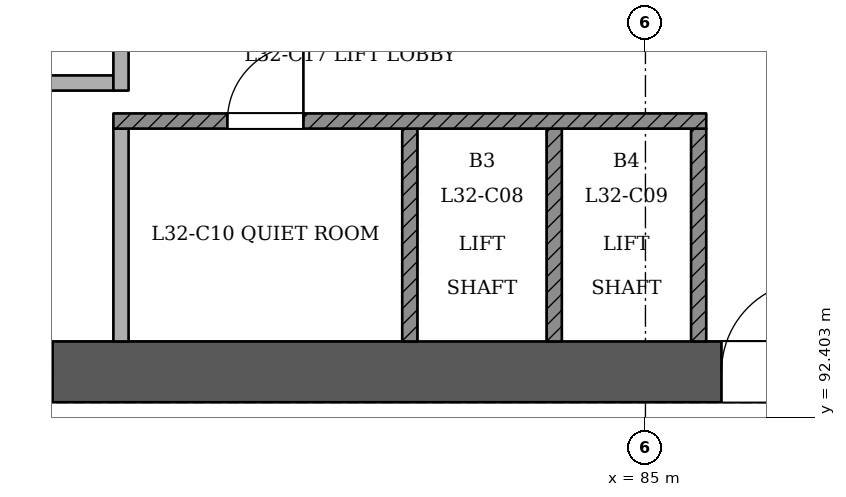
"""IFC4 building model, lengths in metres.
Left out: names, types, materials, properties, quantities, classifications, styles, units other than length and angle.
Written with IfcOpenShell. Run it as: python <this file> out.ifc"""

import sys

from ifc_helpers import new_model, si_unit, direction, frame, frame_2d, origin, place, context, subcontext, project, spatial, rectangle, extrude, element, fill, save


model = new_model("IFC4")
c1 = context("Model", 3, precision=1e-05, world=origin(), true_north=direction((0.0, 1.0)))
c2 = subcontext(c1, "Body", "Model", "MODEL_VIEW")
j1 = project(units=[si_unit("LENGTHUNIT", "METRE"), si_unit("PLANEANGLEUNIT", "RADIAN")], contexts=[c1])
p1 = place(None, origin())
s1 = spatial("IfcSite", under=j1, at=p1, CompositionType="ELEMENT")
p2 = place(p1, origin())
s2 = spatial("IfcBuilding", under=s1, at=p2, CompositionType="ELEMENT")
p3 = place(p2, frame((0.0, 0.0, 127.8)))
s3 = spatial("IfcBuildingStorey", under=s2, at=p3, CompositionType="ELEMENT", Elevation=127.8)
p4 = place(p3, frame((72.6, 93.0, 0.0), z_axis=(0.0, 0.0, 1.0), x_axis=(1.0, 0.0, 0.0)))
e1 = element("IfcWall", 1, at=p4, inside=s3, PredefinedType="SHEAR", context=c2, shape_type="SweptSolid", body=[
    extrude(rectangle(XDim=25.2, YDim=0.8, at=frame_2d((12.6, 0.0))), origin(), (0.0, 0.0, 1.0), 3.6),
])
p5 = place(p4, frame((1.2, 0.0, 0.0)))
e2 = element("IfcOpeningElement", 2, at=p5, cuts=e1, PredefinedType="OPENING", context=c2, shape_type="SweptSolid", body=[
    extrude(rectangle(XDim=1.2, YDim=2.1, at=frame_2d((0.6, 1.05))), frame((0.0, 0.411, 0.0), z_axis=(0.0, -1.0, 0.0), x_axis=(1.0, 0.0, 0.0)), (0.0, 0.0, 1.0), 0.821),
])
p6 = place(p4, frame((3.4, 0.0, 0.0)))
e3 = element("IfcOpeningElement", 3, at=p6, cuts=e1, PredefinedType="OPENING", context=c2, shape_type="SweptSolid", body=[
    extrude(rectangle(XDim=1.2, YDim=2.1, at=frame_2d((0.6, 1.05))), frame((0.0, 0.411, 0.0), z_axis=(0.0, -1.0, 0.0), x_axis=(1.0, 0.0, 0.0)), (0.0, 0.0, 1.0), 0.821),
])
p7 = place(p4, frame((13.4, 0.0, 0.0)))
e4 = element("IfcOpeningElement", 4, at=p7, cuts=e1, PredefinedType="OPENING", context=c2, shape_type="SweptSolid", body=[
    extrude(rectangle(XDim=1.2, YDim=2.1, at=frame_2d((0.6, 1.05))), frame((0.0, 0.411, 0.0), z_axis=(0.0, -1.0, 0.0), x_axis=(1.0, 0.0, 0.0)), (0.0, 0.0, 1.0), 0.821),
])
p8 = place(p4, frame((16.113, 0.0, 0.0)))
e5 = element("IfcOpeningElement", 5, at=p8, cuts=e1, PredefinedType="OPENING", context=c2, shape_type="SweptSolid", body=[
    extrude(rectangle(XDim=1.0, YDim=2.1, at=frame_2d((0.5, 1.05))), frame((0.0, 0.411, 0.0), z_axis=(0.0, -1.0, 0.0), x_axis=(1.0, 0.0, 0.0)), (0.0, 0.0, 1.0), 0.821),
])
p9 = place(p4, frame((20.0, 0.0, 0.0)))
e6 = element("IfcOpeningElement", 6, at=p9, cuts=e1, PredefinedType="OPENING", context=c2, shape_type="SweptSolid", body=[
    extrude(rectangle(XDim=1.0, YDim=2.1, at=frame_2d((0.5, 1.05))), frame((0.0, 0.411, 0.0), z_axis=(0.0, -1.0, 0.0), x_axis=(1.0, 0.0, 0.0)), (0.0, 0.0, 1.0), 0.821),
])
p10 = place(p4, frame((23.137, 0.0, 0.0)))
e7 = element("IfcOpeningElement", 7, at=p10, cuts=e1, PredefinedType="OPENING", context=c2, shape_type="SweptSolid", body=[
    extrude(rectangle(XDim=1.0, YDim=2.1, at=frame_2d((0.5, 1.05))), frame((0.0, 0.411, 0.0), z_axis=(0.0, -1.0, 0.0), x_axis=(1.0, 0.0, 0.0)), (0.0, 0.0, 1.0), 0.821),
])
p11 = place(p3, frame((64.534, 98.206, 0.0), z_axis=(0.0, 0.0, 1.0), x_axis=(0.499999603446, -0.866025632735, 0.0)))
e8 = element("IfcWall", 8, at=p11, inside=s3, PredefinedType="PARTITIONING", context=c2, shape_type="SweptSolid", body=[
    extrude(rectangle(XDim=40.592, YDim=0.15, at=frame_2d((20.296, 0.0))), origin(), (0.0, 0.0, 1.0), 2.75),
])
p12 = place(p11, frame((0.2, 0.0, 0.0)))
e9 = element("IfcOpeningElement", 9, at=p12, cuts=e8, PredefinedType="OPENING", context=c2, shape_type="SweptSolid", body=[
    extrude(rectangle(XDim=1.2, YDim=2.1, at=frame_2d((0.6, 1.05))), frame((0.0, 0.085, 0.0), z_axis=(0.0, -1.0, 0.0), x_axis=(1.0, 0.0, 0.0)), (0.0, 0.0, 1.0), 0.171),
])
p13 = place(p11, frame((3.016, 0.0, 0.0)))
e10 = element("IfcOpeningElement", 10, at=p13, cuts=e8, PredefinedType="OPENING", context=c2, shape_type="SweptSolid", body=[
    extrude(rectangle(XDim=1.0, YDim=2.1, at=frame_2d((0.5, 1.05))), frame((0.0, 0.085, 0.0), z_axis=(0.0, -1.0, 0.0), x_axis=(1.0, 0.0, 0.0)), (0.0, 0.0, 1.0), 0.171),
])
p14 = place(p11, frame((9.691, 0.0, 0.0)))
e11 = element("IfcOpeningElement", 11, at=p14, cuts=e8, PredefinedType="OPENING", context=c2, shape_type="SweptSolid", body=[
    extrude(rectangle(XDim=1.0, YDim=2.1, at=frame_2d((0.5, 1.05))), frame((0.0, 0.085, 0.0), z_axis=(0.0, -1.0, 0.0), x_axis=(1.0, 0.0, 0.0)), (0.0, 0.0, 1.0), 0.171),
])
p15 = place(p11, frame((11.901, 0.0, 0.0)))
e12 = element("IfcOpeningElement", 12, at=p15, cuts=e8, PredefinedType="OPENING", context=c2, shape_type="SweptSolid", body=[
    extrude(rectangle(XDim=1.0, YDim=2.1, at=frame_2d((0.5, 1.05))), frame((0.0, 0.085, 0.0), z_axis=(0.0, -1.0, 0.0), x_axis=(1.0, 0.0, 0.0)), (0.0, 0.0, 1.0), 0.171),
])
p16 = place(p11, frame((18.576, 0.0, 0.0)))
e13 = element("IfcOpeningElement", 13, at=p16, cuts=e8, PredefinedType="OPENING", context=c2, shape_type="SweptSolid", body=[
    extrude(rectangle(XDim=1.0, YDim=2.1, at=frame_2d((0.5, 1.05))), frame((0.0, 0.085, 0.0), z_axis=(0.0, -1.0, 0.0), x_axis=(1.0, 0.0, 0.0)), (0.0, 0.0, 1.0), 0.171),
])
p17 = place(p11, frame((22.046, 0.0, 0.0)))
e14 = element("IfcOpeningElement", 14, at=p17, cuts=e8, PredefinedType="OPENING", context=c2, shape_type="SweptSolid", body=[
    extrude(rectangle(XDim=1.0, YDim=2.1, at=frame_2d((0.5, 1.05))), frame((0.0, 0.085, 0.0), z_axis=(0.0, -1.0, 0.0), x_axis=(1.0, 0.0, 0.0)), (0.0, 0.0, 1.0), 0.171),
])
p18 = place(p11, frame((27.576, 0.0, 0.0)))
e15 = element("IfcOpeningElement", 15, at=p18, cuts=e8, PredefinedType="OPENING", context=c2, shape_type="SweptSolid", body=[
    extrude(rectangle(XDim=1.0, YDim=2.1, at=frame_2d((0.5, 1.05))), frame((0.0, 0.085, 0.0), z_axis=(0.0, -1.0, 0.0), x_axis=(1.0, 0.0, 0.0)), (0.0, 0.0, 1.0), 0.171),
])
p19 = place(p11, frame((31.046, 0.0, 0.0)))
e16 = element("IfcOpeningElement", 16, at=p19, cuts=e8, PredefinedType="OPENING", context=c2, shape_type="SweptSolid", body=[
    extrude(rectangle(XDim=1.0, YDim=2.1, at=frame_2d((0.5, 1.05))), frame((0.0, 0.085, 0.0), z_axis=(0.0, -1.0, 0.0), x_axis=(1.0, 0.0, 0.0)), (0.0, 0.0, 1.0), 0.171),
])
p20 = place(p11, frame((36.576, 0.0, 0.0)))
e17 = element("IfcOpeningElement", 17, at=p20, cuts=e8, PredefinedType="OPENING", context=c2, shape_type="SweptSolid", body=[
    extrude(rectangle(XDim=1.0, YDim=2.1, at=frame_2d((0.5, 1.05))), frame((0.0, 0.085, 0.0), z_axis=(0.0, -1.0, 0.0), x_axis=(1.0, 0.0, 0.0)), (0.0, 0.0, 1.0), 0.171),
])
p21 = place(p11, frame((39.323, 0.0, 0.0)))
e18 = element("IfcOpeningElement", 18, at=p21, cuts=e8, PredefinedType="OPENING", context=c2, shape_type="SweptSolid", body=[
    extrude(rectangle(XDim=1.0, YDim=2.1, at=frame_2d((0.5, 1.05))), frame((0.0, 0.085, 0.0), z_axis=(0.0, -1.0, 0.0), x_axis=(1.0, 0.0, 0.0)), (0.0, 0.0, 1.0), 0.171),
])
p22 = place(p3, frame((85.17, 63.052, 0.0), z_axis=(0.0, 0.0, 1.0), x_axis=(0.499999603446, 0.866025632735, 0.0)))
e19 = element("IfcWall", 19, at=p22, inside=s3, PredefinedType="PARTITIONING", context=c2, shape_type="SweptSolid", body=[
    extrude(rectangle(XDim=40.592, YDim=0.15, at=frame_2d((20.296, 0.0))), origin(), (0.0, 0.0, 1.0), 2.75),
])
p23 = place(p22, frame((0.273, 0.0, 0.0)))
e20 = element("IfcOpeningElement", 20, at=p23, cuts=e19, PredefinedType="OPENING", context=c2, shape_type="SweptSolid", body=[
    extrude(rectangle(XDim=1.2, YDim=2.1, at=frame_2d((0.6, 1.05))), frame((0.0, 0.085, 0.0), z_axis=(0.0, -1.0, 0.0), x_axis=(1.0, 0.0, 0.0)), (0.0, 0.0, 1.0), 0.171),
])
p24 = place(p22, frame((4.046, 0.0, 0.0)))
e21 = element("IfcOpeningElement", 21, at=p24, cuts=e19, PredefinedType="OPENING", context=c2, shape_type="SweptSolid", body=[
    extrude(rectangle(XDim=1.0, YDim=2.1, at=frame_2d((0.5, 1.05))), frame((0.0, 0.085, 0.0), z_axis=(0.0, -1.0, 0.0), x_axis=(1.0, 0.0, 0.0)), (0.0, 0.0, 1.0), 0.171),
])
p25 = place(p22, frame((9.576, 0.0, 0.0)))
e22 = element("IfcOpeningElement", 22, at=p25, cuts=e19, PredefinedType="OPENING", context=c2, shape_type="SweptSolid", body=[
    extrude(rectangle(XDim=1.0, YDim=2.1, at=frame_2d((0.5, 1.05))), frame((0.0, 0.085, 0.0), z_axis=(0.0, -1.0, 0.0), x_axis=(1.0, 0.0, 0.0)), (0.0, 0.0, 1.0), 0.171),
])
p26 = place(p22, frame((11.901, 0.0, 0.0)))
e23 = element("IfcOpeningElement", 23, at=p26, cuts=e19, PredefinedType="OPENING", context=c2, shape_type="SweptSolid", body=[
    extrude(rectangle(XDim=1.0, YDim=2.1, at=frame_2d((0.5, 1.05))), frame((0.0, 0.085, 0.0), z_axis=(0.0, -1.0, 0.0), x_axis=(1.0, 0.0, 0.0)), (0.0, 0.0, 1.0), 0.171),
])
p27 = place(p22, frame((18.691, 0.0, 0.0)))
e24 = element("IfcOpeningElement", 24, at=p27, cuts=e19, PredefinedType="OPENING", context=c2, shape_type="SweptSolid", body=[
    extrude(rectangle(XDim=1.0, YDim=2.1, at=frame_2d((0.5, 1.05))), frame((0.0, 0.085, 0.0), z_axis=(0.0, -1.0, 0.0), x_axis=(1.0, 0.0, 0.0)), (0.0, 0.0, 1.0), 0.171),
])
p28 = place(p22, frame((21.016, 0.0, 0.0)))
e25 = element("IfcOpeningElement", 25, at=p28, cuts=e19, PredefinedType="OPENING", context=c2, shape_type="SweptSolid", body=[
    extrude(rectangle(XDim=1.0, YDim=2.1, at=frame_2d((0.5, 1.05))), frame((0.0, 0.085, 0.0), z_axis=(0.0, -1.0, 0.0), x_axis=(1.0, 0.0, 0.0)), (0.0, 0.0, 1.0), 0.171),
])
p29 = place(p22, frame((27.576, 0.0, 0.0)))
e26 = element("IfcOpeningElement", 26, at=p29, cuts=e19, PredefinedType="OPENING", context=c2, shape_type="SweptSolid", body=[
    extrude(rectangle(XDim=1.0, YDim=2.1, at=frame_2d((0.5, 1.05))), frame((0.0, 0.085, 0.0), z_axis=(0.0, -1.0, 0.0), x_axis=(1.0, 0.0, 0.0)), (0.0, 0.0, 1.0), 0.171),
])
p30 = place(p22, frame((30.016, 0.0, 0.0)))
e27 = element("IfcOpeningElement", 27, at=p30, cuts=e19, PredefinedType="OPENING", context=c2, shape_type="SweptSolid", body=[
    extrude(rectangle(XDim=1.0, YDim=2.1, at=frame_2d((0.5, 1.05))), frame((0.0, 0.085, 0.0), z_axis=(0.0, -1.0, 0.0), x_axis=(1.0, 0.0, 0.0)), (0.0, 0.0, 1.0), 0.171),
])
p31 = place(p22, frame((39.192, 0.0, 0.0)))
e28 = element("IfcOpeningElement", 28, at=p31, cuts=e19, PredefinedType="OPENING", context=c2, shape_type="SweptSolid", body=[
    extrude(rectangle(XDim=1.2, YDim=2.1, at=frame_2d((0.6, 1.05))), frame((0.0, 0.085, 0.0), z_axis=(0.0, -1.0, 0.0), x_axis=(1.0, 0.0, 0.0)), (0.0, 0.0, 1.0), 0.171),
])
p32 = place(p3, frame((78.1, 93.4, 0.0), z_axis=(0.0, 0.0, 1.0), x_axis=(0.0, 1.0, 0.0)))
e29 = element("IfcWall", 29, at=p32, inside=s3, PredefinedType="PARTITIONING", context=c2, shape_type="SweptSolid", body=[
    extrude(rectangle(XDim=2.8, YDim=0.2, at=frame_2d((1.4, 0.0))), origin(), (0.0, 0.0, 1.0), 3.15),
])
for number, where, z_axis, x_axis in (
    (30, (81.9, 93.4, 0.0), (0.0, 0.0, 1.0), (0.0, 1.0, 0.0)),
    (31, (83.8, 93.4, 0.0), (0.0, 0.0, 1.0), (0.0, 1.0, 0.0)),
    (32, (85.7, 93.4, 0.0), (0.0, 0.0, 1.0), (0.0, 1.0, 0.0)),
):
    element("IfcWall", number, at=place(p3, frame(where, z_axis=z_axis, x_axis=x_axis)), inside=s3, PredefinedType="SOLIDWALL", context=c2, shape_type="SweptSolid", body=[
        extrude(rectangle(XDim=2.8, YDim=0.2, at=frame_2d((1.4, 0.0))), origin(), (0.0, 0.0, 1.0), 3.15),
    ])
p33 = place(p3, frame((78.0, 96.3, 0.0), z_axis=(0.0, 0.0, 1.0), x_axis=(1.0, 0.0, 0.0)))
e33 = element("IfcWall", 33, at=p33, inside=s3, PredefinedType="SOLIDWALL", context=c2, shape_type="SweptSolid", body=[
    extrude(rectangle(XDim=7.8, YDim=0.2, at=frame_2d((3.9, 0.0))), origin(), (0.0, 0.0, 1.0), 3.15),
])
p34 = place(p33, frame((1.5, 0.0, 0.0)))
e34 = element("IfcOpeningElement", 34, at=p34, cuts=e33, PredefinedType="OPENING", context=c2, shape_type="SweptSolid", body=[
    extrude(rectangle(XDim=1.0, YDim=2.1, at=frame_2d((0.5, 1.05))), frame((0.0, 0.11, 0.0), z_axis=(0.0, -1.0, 0.0), x_axis=(1.0, 0.0, 0.0)), (0.0, 0.0, 1.0), 0.221),
])
p35 = place(p3, frame((76.1, 96.8, 0.0), z_axis=(0.0, 0.0, 1.0), x_axis=(1.0, 0.0, 0.0)))
e35 = element("IfcWall", 35, at=p35, inside=s3, PredefinedType="PARTITIONING", context=c2, shape_type="SweptSolid", body=[
    extrude(rectangle(XDim=1.9, YDim=0.2, at=frame_2d((0.95, 0.0))), origin(), (0.0, 0.0, 1.0), 3.15),
])
p36 = place(p3, frame((78.1, 96.7, 0.0), z_axis=(0.0, 0.0, 1.0), x_axis=(0.0, 1.0, 0.0)))
e36 = element("IfcWall", 36, at=p36, inside=s3, PredefinedType="PARTITIONING", context=c2, shape_type="SweptSolid", body=[
    extrude(rectangle(XDim=3.7, YDim=0.2, at=frame_2d((1.85, 0.0))), origin(), (0.0, 0.0, 1.0), 3.15),
])
p37 = place(p36, frame((1.95, 0.0, 0.0)))
e37 = element("IfcOpeningElement", 37, at=p37, cuts=e36, PredefinedType="OPENING", context=c2, shape_type="SweptSolid", body=[
    extrude(rectangle(XDim=1.1, YDim=2.1, at=frame_2d((0.55, 1.05))), frame((0.0, 0.11, 0.0), z_axis=(0.0, -1.0, 0.0), x_axis=(1.0, 0.0, 0.0)), (0.0, 0.0, 1.0), 0.221),
])
p38 = place(p6, origin())
e38 = element("IfcDoor", 38, at=p38, inside=s3, OperationType="SINGLE_SWING_LEFT", PredefinedType="NOTDEFINED", context=c2, shape_type="SweptSolid", body=[
    extrude(rectangle(XDim=1.2, YDim=2.1, at=frame_2d((0.6, 1.05))), frame((0.0, 0.025, 0.0), z_axis=(0.0, -1.0, 0.0), x_axis=(1.0, 0.0, 0.0)), (0.0, 0.0, 1.0), 0.05),
])
fill(e3, e38)
p39 = place(p7, origin())
e39 = element("IfcDoor", 39, at=p39, inside=s3, OperationType="SINGLE_SWING_RIGHT", PredefinedType="NOTDEFINED", context=c2, shape_type="SweptSolid", body=[
    extrude(rectangle(XDim=1.2, YDim=2.1, at=frame_2d((0.6, 1.05))), frame((0.0, 0.025, 0.0), z_axis=(0.0, -1.0, 0.0), x_axis=(1.0, 0.0, 0.0)), (0.0, 0.0, 1.0), 0.05),
])
fill(e4, e39)
p40 = place(p34, origin())
e40 = element("IfcDoor", 40, at=p40, inside=s3, OperationType="SINGLE_SWING_RIGHT", PredefinedType="NOTDEFINED", context=c2, shape_type="SweptSolid", body=[
    extrude(rectangle(XDim=1.0, YDim=2.1, at=frame_2d((0.5, 1.05))), frame((0.0, 0.025, 0.0), z_axis=(0.0, -1.0, 0.0), x_axis=(1.0, 0.0, 0.0)), (0.0, 0.0, 1.0), 0.05),
])
fill(e34, e40)
save(model, sys.argv[1])
